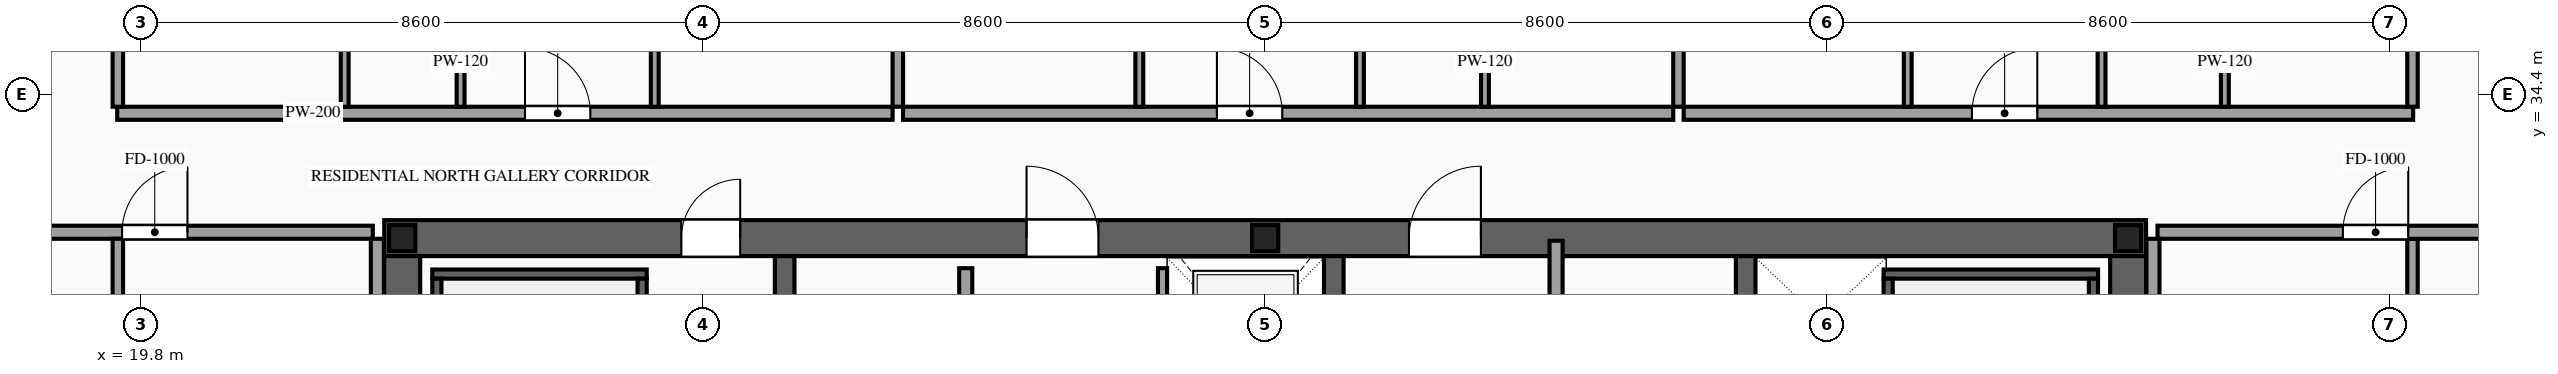
"""IFC4 building model, lengths in metres.
Left out: names, types, materials, properties, quantities, classifications, styles, units other than length and angle.
Written with IfcOpenShell. Run it as: python <this file> out.ifc"""

import sys

from ifc_helpers import new_model, si_unit, direction, frame, frame_2d, origin, origin_2d, place, context, subcontext, project, spatial, rectangle, i_section, extrude, source, transform, mapped, element, fill, save


model = new_model("IFC4")
c1 = context("Model", 3, precision=1e-05, world=origin(), true_north=direction((0.0, 1.0)))
c2 = subcontext(c1, "Body", "Model", "MODEL_VIEW")
j1 = project(units=[si_unit("LENGTHUNIT", "METRE"), si_unit("PLANEANGLEUNIT", "RADIAN")], contexts=[c1])
p1 = place(None, origin())
s1 = spatial("IfcSite", under=j1, at=p1, CompositionType="ELEMENT")
p2 = place(p1, origin())
s2 = spatial("IfcBuilding", under=s1, at=p2, CompositionType="ELEMENT")
p3 = place(p2, frame((0.0, 0.0, 252.1)))
s3 = spatial("IfcBuildingStorey", under=s2, at=p3, CompositionType="ELEMENT", Elevation=252.1)
p4 = place(p3, frame((23.525, 32.2, 0.0), z_axis=(0.0, 0.0, 1.0), x_axis=(1.0, 0.0, 0.0)))
e1 = element("IfcWall", 1, at=p4, inside=s3, PredefinedType="SHEAR", context=c2, shape_type="SweptSolid", body=[
    extrude(rectangle(XDim=26.95, YDim=0.55, at=frame_2d((13.475, 0.0))), origin(), (0.0, 0.0, 1.0), 3.5),
])
p5 = place(p4, frame((4.545, 0.0, 0.0)))
e2 = element("IfcOpeningElement", 2, at=p5, cuts=e1, PredefinedType="OPENING", context=c2, shape_type="SweptSolid", body=[
    extrude(rectangle(XDim=0.9, YDim=2.15, at=frame_2d((0.45, 1.075))), frame((0.0, 0.29, 0.0), z_axis=(0.0, -1.0, 0.0), x_axis=(1.0, 0.0, 0.0)), (0.0, 0.0, 1.0), 0.58),
])
p6 = place(p4, frame((9.825, 0.0, 0.0)))
e3 = element("IfcOpeningElement", 3, at=p6, cuts=e1, PredefinedType="OPENING", context=c2, shape_type="SweptSolid", body=[
    extrude(rectangle(XDim=1.1, YDim=2.2, at=frame_2d((0.55, 1.1))), frame((0.0, 0.29, 0.0), z_axis=(0.0, -1.0, 0.0), x_axis=(1.0, 0.0, 0.0)), (0.0, 0.0, 1.0), 0.58),
])
p7 = place(p4, frame((15.675, 0.0, 0.0)))
e4 = element("IfcOpeningElement", 4, at=p7, cuts=e1, PredefinedType="OPENING", context=c2, shape_type="SweptSolid", body=[
    extrude(rectangle(XDim=1.1, YDim=2.2, at=frame_2d((0.55, 1.1))), frame((0.0, 0.29, 0.0), z_axis=(0.0, -1.0, 0.0), x_axis=(1.0, 0.0, 0.0)), (0.0, 0.0, 1.0), 0.58),
])
m1 = source(origin(), c2, "Body", "SweptSolid", [
    extrude(rectangle(XDim=12.25, YDim=0.55, at=frame_2d((6.125, 0.0))), origin(), (0.0, 0.0, 1.0), 3.5),
])
for number, where, z_axis, x_axis in (
    (5, (23.8, 19.675, 0.0), (0.0, 0.0, 1.0), (0.0, 1.0, 0.0)),
    (6, (50.2, 19.675, 0.0), (0.0, 0.0, 1.0), (0.0, 1.0, 0.0)),
):
    element("IfcWall", number, at=place(p3, frame(where, z_axis=z_axis, x_axis=x_axis)), inside=s3, PredefinedType="SHEAR", context=c2, shape_type="MappedRepresentation", body=[
        mapped(m1, transform((0.0, 0.0, 0.0), scale=1.0)),
    ])
m2 = source(origin(), c2, "Body", "SweptSolid", [
    extrude(rectangle(XDim=12.25, YDim=0.3, at=frame_2d((6.125, 0.0))), origin(), (0.0, 0.0, 1.0), 3.5),
])
for number, where, z_axis, x_axis in (
    (7, (29.65, 19.675, 0.0), (0.0, 0.0, 1.0), (0.0, 1.0, 0.0)),
    (8, (38.05, 19.675, 0.0), (0.0, 0.0, 1.0), (0.0, 1.0, 0.0)),
    (9, (44.35, 19.675, 0.0), (0.0, 0.0, 1.0), (0.0, 1.0, 0.0)),
):
    element("IfcWall", number, at=place(p3, frame(where, z_axis=z_axis, x_axis=x_axis)), inside=s3, PredefinedType="SOLIDWALL", context=c2, shape_type="MappedRepresentation", body=[
        mapped(m2, transform((0.0, 0.0, 0.0), scale=1.0)),
    ])
m3 = source(origin(), c2, "Body", "SweptSolid", [
    extrude(i_section(OverallWidth=0.4, OverallDepth=0.4, WebThickness=0.013, FlangeThickness=0.021, at=origin_2d()), origin(), (0.0, 0.0, 1.0), 3.5),
])
for number, where, z_axis, x_axis in (
    (10, (23.8, 32.2, 0.0), (0.0, 0.0, 1.0), (1.0, 0.0, 0.0)),
    (11, (37.0, 32.2, 0.0), (0.0, 0.0, 1.0), (1.0, 0.0, 0.0)),
    (12, (50.2, 32.2, 0.0), (0.0, 0.0, 1.0), (1.0, 0.0, 0.0)),
):
    element("IfcColumn", number, at=place(p3, frame(where, z_axis=z_axis, x_axis=x_axis)), inside=s3, PredefinedType="COLUMN", context=c2, shape_type="MappedRepresentation", body=[
        mapped(m3, transform((0.0, 0.0, 0.0), scale=1.0)),
    ])
p8 = place(p3, frame((35.43, 29.4, 0.0), z_axis=(0.0, 0.0, 1.0), x_axis=(0.0, 1.0, 0.0)))
e13 = element("IfcWall", 13, at=p8, inside=s3, PredefinedType="SOLIDWALL", context=c2, shape_type="SweptSolid", body=[
    extrude(rectangle(XDim=2.34, YDim=0.14, at=frame_2d((1.17, 0.0))), origin(), (0.0, 0.0, 1.0), 3.28),
])
p9 = place(p8, frame((0.62, 0.0, 0.0)))
e14 = element("IfcOpeningElement", 14, at=p9, cuts=e13, PredefinedType="OPENING", context=c2, shape_type="SweptSolid", body=[
    extrude(rectangle(XDim=1.1, YDim=2.2, at=frame_2d((0.55, 1.1))), frame((0.0, 0.085, 0.0), z_axis=(0.0, -1.0, 0.0), x_axis=(1.0, 0.0, 0.0)), (0.0, 0.0, 1.0), 0.17),
])
m4 = source(origin(), c2, "Body", "SweptSolid", [
    extrude(rectangle(XDim=3.28, YDim=0.14, at=frame_2d((1.64, 0.0))), origin(), (0.0, 0.0, 1.0), 3.28),
])
p10 = place(p3, frame((24.26, 31.65, 0.0), z_axis=(0.0, 0.0, 1.0), x_axis=(1.0, 0.0, 0.0)))
e15 = element("IfcWall", 15, at=p10, inside=s3, PredefinedType="SOLIDWALL", context=c2, shape_type="MappedRepresentation", body=[
    mapped(m4, transform((0.0, 0.0, 0.0), scale=1.0)),
])
m5 = source(origin(), c2, "Body", "SweptSolid", [
    extrude(rectangle(XDim=8.94, YDim=0.14, at=frame_2d((4.47, 0.0))), origin(), (0.0, 0.0, 1.0), 3.28),
])
for number, where, z_axis, x_axis in (
    (16, (24.33, 22.64, 0.0), (0.0, 0.0, 1.0), (0.0, 1.0, 0.0)),
    (17, (27.47, 22.64, 0.0), (0.0, 0.0, 1.0), (0.0, 1.0, 0.0)),
):
    element("IfcWall", number, at=place(p3, frame(where, z_axis=z_axis, x_axis=x_axis)), inside=s3, PredefinedType="SOLIDWALL", context=c2, shape_type="MappedRepresentation", body=[
        mapped(m5, transform((0.0, 0.0, 0.0), scale=1.0)),
    ])
p11 = place(p3, frame((46.46, 31.65, 0.0), z_axis=(0.0, 0.0, 1.0), x_axis=(1.0, 0.0, 0.0)))
e18 = element("IfcWall", 18, at=p11, inside=s3, PredefinedType="SOLIDWALL", context=c2, shape_type="MappedRepresentation", body=[
    mapped(m4, transform((0.0, 0.0, 0.0), scale=1.0)),
])
for number, where, z_axis, x_axis in (
    (19, (46.53, 22.64, 0.0), (0.0, 0.0, 1.0), (0.0, 1.0, 0.0)),
    (20, (49.67, 22.64, 0.0), (0.0, 0.0, 1.0), (0.0, 1.0, 0.0)),
):
    element("IfcWall", number, at=place(p3, frame(where, z_axis=z_axis, x_axis=x_axis)), inside=s3, PredefinedType="SOLIDWALL", context=c2, shape_type="MappedRepresentation", body=[
        mapped(m5, transform((0.0, 0.0, 0.0), scale=1.0)),
    ])
p12 = place(p3, frame((32.42, 19.86, 0.0), z_axis=(0.0, 0.0, 1.0), x_axis=(0.0, 1.0, 0.0)))
e21 = element("IfcWall", 21, at=p12, inside=s3, PredefinedType="PARTITIONING", context=c2, shape_type="SweptSolid", body=[
    extrude(rectangle(XDim=11.88, YDim=0.2, at=frame_2d((5.94, 0.0))), origin(), (0.0, 0.0, 1.0), 3.28),
])
p13 = place(p12, frame((5.49, 0.0, 0.0)))
e22 = element("IfcOpeningElement", 22, at=p13, cuts=e21, PredefinedType="OPENING", context=c2, shape_type="SweptSolid", body=[
    extrude(rectangle(XDim=0.9, YDim=2.15, at=frame_2d((0.45, 1.075))), frame((0.0, 0.115, 0.0), z_axis=(0.0, -1.0, 0.0), x_axis=(1.0, 0.0, 0.0)), (0.0, 0.0, 1.0), 0.23),
])
m6 = source(origin(), c2, "Body", "SweptSolid", [
    extrude(rectangle(XDim=12.72, YDim=0.2, at=frame_2d((6.36, 0.0))), origin(), (0.0, 0.0, 1.0), 3.28),
])
p14 = place(p3, frame((41.45, 19.44, 0.0), z_axis=(0.0, 0.0, 1.0), x_axis=(0.0, 1.0, 0.0)))
e23 = element("IfcWall", 23, at=p14, inside=s3, PredefinedType="PARTITIONING", context=c2, shape_type="MappedRepresentation", body=[
    mapped(m6, transform((0.0, 0.0, 0.0), scale=1.0)),
])
p15 = place(p3, frame((19.44, 34.11, 0.0), z_axis=(0.0, 0.0, 1.0), x_axis=(1.0, 0.0, 0.0)))
e24 = element("IfcWall", 24, at=p15, inside=s3, PredefinedType="PARTITIONING", context=c2, shape_type="SweptSolid", body=[
    extrude(rectangle(XDim=11.861, YDim=0.2, at=frame_2d((5.931, 0.0))), origin(), (0.0, 0.0, 1.0), 3.28),
])
p16 = place(p15, frame((6.238, 0.0, 0.0)))
e25 = element("IfcOpeningElement", 25, at=p16, cuts=e24, PredefinedType="OPENING", context=c2, shape_type="SweptSolid", body=[
    extrude(rectangle(XDim=1.0, YDim=2.2, at=frame_2d((0.5, 1.1))), frame((0.0, 0.115, 0.0), z_axis=(0.0, -1.0, 0.0), x_axis=(1.0, 0.0, 0.0)), (0.0, 0.0, 1.0), 0.23),
])
m7 = source(origin(), c2, "Body", "SweptSolid", [
    extrude(rectangle(XDim=12.04, YDim=0.16, at=frame_2d((6.02, 0.0))), origin(), (0.0, 0.0, 1.0), 3.28),
])
p17 = place(p3, frame((31.381, 34.21, 0.0), z_axis=(0.0, 0.0, 1.0), x_axis=(0.0, 1.0, 0.0)))
e26 = element("IfcWall", 26, at=p17, inside=s3, PredefinedType="PARTITIONING", context=c2, shape_type="MappedRepresentation", body=[
    mapped(m7, transform((0.0, 0.0, 0.0), scale=1.0)),
])
m8 = source(origin(), c2, "Body", "SweptSolid", [
    extrude(rectangle(XDim=4.11, YDim=0.12, at=frame_2d((2.055, 0.0))), origin(), (0.0, 0.0, 1.0), 3.28),
])
p18 = place(p3, frame((22.92, 34.21, 0.0), z_axis=(0.0, 0.0, 1.0), x_axis=(0.0, 1.0, 0.0)))
e27 = element("IfcWall", 27, at=p18, inside=s3, PredefinedType="PARTITIONING", context=c2, shape_type="MappedRepresentation", body=[
    mapped(m8, transform((0.0, 0.0, 0.0), scale=1.0)),
])
p19 = place(p3, frame((24.693, 34.21, 0.0), z_axis=(0.0, 0.0, 1.0), x_axis=(0.0, 1.0, 0.0)))
e28 = element("IfcWall", 28, at=p19, inside=s3, PredefinedType="PARTITIONING", context=c2, shape_type="SweptSolid", body=[
    extrude(rectangle(XDim=4.11, YDim=0.12, at=frame_2d((2.055, 0.0))), origin(), (0.0, 0.0, 1.0), 3.28),
])
p20 = place(p19, frame((1.63, 0.0, 0.0)))
e29 = element("IfcOpeningElement", 29, at=p20, cuts=e28, PredefinedType="OPENING", context=c2, shape_type="SweptSolid", body=[
    extrude(rectangle(XDim=0.85, YDim=2.1, at=frame_2d((0.425, 1.05))), frame((0.0, 0.075, 0.0), z_axis=(0.0, -1.0, 0.0), x_axis=(1.0, 0.0, 0.0)), (0.0, 0.0, 1.0), 0.15),
])
p21 = place(p3, frame((27.663, 34.21, 0.0), z_axis=(0.0, 0.0, 1.0), x_axis=(0.0, 1.0, 0.0)))
e30 = element("IfcWall", 30, at=p21, inside=s3, PredefinedType="PARTITIONING", context=c2, shape_type="MappedRepresentation", body=[
    mapped(m8, transform((0.0, 0.0, 0.0), scale=1.0)),
])
p22 = place(p3, frame((31.461, 34.11, 0.0), z_axis=(0.0, 0.0, 1.0), x_axis=(1.0, 0.0, 0.0)))
e31 = element("IfcWall", 31, at=p22, inside=s3, PredefinedType="PARTITIONING", context=c2, shape_type="SweptSolid", body=[
    extrude(rectangle(XDim=11.781, YDim=0.2, at=frame_2d((5.891, 0.0))), origin(), (0.0, 0.0, 1.0), 3.28),
])
p23 = place(p22, frame((4.801, 0.0, 0.0)))
e32 = element("IfcOpeningElement", 32, at=p23, cuts=e31, PredefinedType="OPENING", context=c2, shape_type="SweptSolid", body=[
    extrude(rectangle(XDim=1.0, YDim=2.2, at=frame_2d((0.5, 1.1))), frame((0.0, 0.115, 0.0), z_axis=(0.0, -1.0, 0.0), x_axis=(1.0, 0.0, 0.0)), (0.0, 0.0, 1.0), 0.23),
])
p24 = place(p3, frame((43.322, 34.21, 0.0), z_axis=(0.0, 0.0, 1.0), x_axis=(0.0, 1.0, 0.0)))
e33 = element("IfcWall", 33, at=p24, inside=s3, PredefinedType="PARTITIONING", context=c2, shape_type="MappedRepresentation", body=[
    mapped(m7, transform((0.0, 0.0, 0.0), scale=1.0)),
])
p25 = place(p3, frame((35.075, 34.21, 0.0), z_axis=(0.0, 0.0, 1.0), x_axis=(0.0, 1.0, 0.0)))
e34 = element("IfcWall", 34, at=p25, inside=s3, PredefinedType="PARTITIONING", context=c2, shape_type="MappedRepresentation", body=[
    mapped(m8, transform((0.0, 0.0, 0.0), scale=1.0)),
])
p26 = place(p3, frame((40.362, 34.21, 0.0), z_axis=(0.0, 0.0, 1.0), x_axis=(0.0, 1.0, 0.0)))
e35 = element("IfcWall", 35, at=p26, inside=s3, PredefinedType="PARTITIONING", context=c2, shape_type="SweptSolid", body=[
    extrude(rectangle(XDim=4.11, YDim=0.12, at=frame_2d((2.055, 0.0))), origin(), (0.0, 0.0, 1.0), 3.28),
])
p27 = place(p26, frame((1.63, 0.0, 0.0)))
e36 = element("IfcOpeningElement", 36, at=p27, cuts=e35, PredefinedType="OPENING", context=c2, shape_type="SweptSolid", body=[
    extrude(rectangle(XDim=0.85, YDim=2.1, at=frame_2d((0.425, 1.05))), frame((0.0, 0.075, 0.0), z_axis=(0.0, -1.0, 0.0), x_axis=(1.0, 0.0, 0.0)), (0.0, 0.0, 1.0), 0.15),
])
p28 = place(p3, frame((38.45, 34.21, 0.0), z_axis=(0.0, 0.0, 1.0), x_axis=(0.0, 1.0, 0.0)))
e37 = element("IfcWall", 37, at=p28, inside=s3, PredefinedType="PARTITIONING", context=c2, shape_type="SweptSolid", body=[
    extrude(rectangle(XDim=4.11, YDim=0.12, at=frame_2d((2.055, 0.0))), origin(), (0.0, 0.0, 1.0), 3.28),
])
p29 = place(p28, frame((1.63, 0.0, 0.0)))
e38 = element("IfcOpeningElement", 38, at=p29, cuts=e37, PredefinedType="OPENING", context=c2, shape_type="SweptSolid", body=[
    extrude(rectangle(XDim=0.85, YDim=2.1, at=frame_2d((0.425, 1.05))), frame((0.0, 0.075, 0.0), z_axis=(0.0, -1.0, 0.0), x_axis=(1.0, 0.0, 0.0)), (0.0, 0.0, 1.0), 0.15),
])
p30 = place(p3, frame((43.402, 34.11, 0.0), z_axis=(0.0, 0.0, 1.0), x_axis=(1.0, 0.0, 0.0)))
e39 = element("IfcWall", 39, at=p30, inside=s3, PredefinedType="PARTITIONING", context=c2, shape_type="SweptSolid", body=[
    extrude(rectangle(XDim=11.158, YDim=0.2, at=frame_2d((5.579, 0.0))), origin(), (0.0, 0.0, 1.0), 3.28),
])
p31 = place(p30, frame((4.409, 0.0, 0.0)))
e40 = element("IfcOpeningElement", 40, at=p31, cuts=e39, PredefinedType="OPENING", context=c2, shape_type="SweptSolid", body=[
    extrude(rectangle(XDim=1.0, YDim=2.2, at=frame_2d((0.5, 1.1))), frame((0.0, 0.115, 0.0), z_axis=(0.0, -1.0, 0.0), x_axis=(1.0, 0.0, 0.0)), (0.0, 0.0, 1.0), 0.23),
])
m9 = source(origin(), c2, "Body", "SweptSolid", [
    extrude(rectangle(XDim=11.89, YDim=0.16, at=frame_2d((5.945, 0.0))), origin(), (0.0, 0.0, 1.0), 3.28),
])
for number, where, z_axis, x_axis in (
    (41, (19.45, 34.21, 0.0), (0.0, 0.0, 1.0), (0.0, 1.0, 0.0)),
    (42, (54.55, 34.21, 0.0), (0.0, 0.0, 1.0), (0.0, 1.0, 0.0)),
):
    element("IfcWall", number, at=place(p3, frame(where, z_axis=z_axis, x_axis=x_axis)), inside=s3, PredefinedType="PARTITIONING", context=c2, shape_type="MappedRepresentation", body=[
        mapped(m9, transform((0.0, 0.0, 0.0), scale=1.0)),
    ])
p32 = place(p3, frame((46.829, 34.21, 0.0), z_axis=(0.0, 0.0, 1.0), x_axis=(0.0, 1.0, 0.0)))
e43 = element("IfcWall", 43, at=p32, inside=s3, PredefinedType="PARTITIONING", context=c2, shape_type="MappedRepresentation", body=[
    mapped(m8, transform((0.0, 0.0, 0.0), scale=1.0)),
])
p33 = place(p3, frame((51.68, 34.21, 0.0), z_axis=(0.0, 0.0, 1.0), x_axis=(0.0, 1.0, 0.0)))
e44 = element("IfcWall", 44, at=p33, inside=s3, PredefinedType="PARTITIONING", context=c2, shape_type="SweptSolid", body=[
    extrude(rectangle(XDim=4.11, YDim=0.12, at=frame_2d((2.055, 0.0))), origin(), (0.0, 0.0, 1.0), 3.28),
])
p34 = place(p33, frame((1.63, 0.0, 0.0)))
e45 = element("IfcOpeningElement", 45, at=p34, cuts=e44, PredefinedType="OPENING", context=c2, shape_type="SweptSolid", body=[
    extrude(rectangle(XDim=0.85, YDim=2.1, at=frame_2d((0.425, 1.05))), frame((0.0, 0.075, 0.0), z_axis=(0.0, -1.0, 0.0), x_axis=(1.0, 0.0, 0.0)), (0.0, 0.0, 1.0), 0.15),
])
p35 = place(p3, frame((49.794, 34.21, 0.0), z_axis=(0.0, 0.0, 1.0), x_axis=(0.0, 1.0, 0.0)))
e46 = element("IfcWall", 46, at=p35, inside=s3, PredefinedType="PARTITIONING", context=c2, shape_type="SweptSolid", body=[
    extrude(rectangle(XDim=4.11, YDim=0.12, at=frame_2d((2.055, 0.0))), origin(), (0.0, 0.0, 1.0), 3.28),
])
p36 = place(p35, frame((1.63, 0.0, 0.0)))
e47 = element("IfcOpeningElement", 47, at=p36, cuts=e46, PredefinedType="OPENING", context=c2, shape_type="SweptSolid", body=[
    extrude(rectangle(XDim=0.85, YDim=2.1, at=frame_2d((0.425, 1.05))), frame((0.0, 0.075, 0.0), z_axis=(0.0, -1.0, 0.0), x_axis=(1.0, 0.0, 0.0)), (0.0, 0.0, 1.0), 0.15),
])
p37 = place(p3, frame((16.55, 32.29, 0.0), z_axis=(0.0, 0.0, 1.0), x_axis=(1.0, 0.0, 0.0)))
e48 = element("IfcWall", 48, at=p37, inside=s3, PredefinedType="PARTITIONING", context=c2, shape_type="SweptSolid", body=[
    extrude(rectangle(XDim=6.8, YDim=0.2, at=frame_2d((3.4, 0.0))), origin(), (0.0, 0.0, 1.0), 2.825),
])
p38 = place(p37, frame((2.965, 0.0, 0.0)))
e49 = element("IfcOpeningElement", 49, at=p38, cuts=e48, PredefinedType="OPENING", context=c2, shape_type="SweptSolid", body=[
    extrude(rectangle(XDim=1.0, YDim=2.2, at=frame_2d((0.5, 1.1))), frame((0.0, 0.115, 0.0), z_axis=(0.0, -1.0, 0.0), x_axis=(1.0, 0.0, 0.0)), (0.0, 0.0, 1.0), 0.23),
])
m10 = source(origin(), c2, "Body", "SweptSolid", [
    extrude(rectangle(XDim=26.69, YDim=0.16, at=frame_2d((13.345, 0.0))), origin(), (0.0, 0.0, 1.0), 3.28),
])
for number, where, z_axis, x_axis in (
    (50, (19.45, 5.5, 0.0), (0.0, 0.0, 1.0), (0.0, 1.0, 0.0)),
    (51, (54.55, 5.5, 0.0), (0.0, 0.0, 1.0), (0.0, 1.0, 0.0)),
):
    element("IfcWall", number, at=place(p3, frame(where, z_axis=z_axis, x_axis=x_axis)), inside=s3, PredefinedType="PARTITIONING", context=c2, shape_type="MappedRepresentation", body=[
        mapped(m10, transform((0.0, 0.0, 0.0), scale=1.0)),
    ])
m11 = source(origin(), c2, "Body", "SweptSolid", [
    extrude(rectangle(XDim=6.29, YDim=0.2, at=frame_2d((3.145, 0.0))), origin(), (0.0, 0.0, 1.0), 3.28),
])
p39 = place(p3, frame((23.42, 25.9, 0.0), z_axis=(0.0, 0.0, 1.0), x_axis=(0.0, 1.0, 0.0)))
e52 = element("IfcWall", 52, at=p39, inside=s3, PredefinedType="PARTITIONING", context=c2, shape_type="MappedRepresentation", body=[
    mapped(m11, transform((0.0, 0.0, 0.0), scale=1.0)),
])
p40 = place(p3, frame((50.65, 32.29, 0.0), z_axis=(0.0, 0.0, 1.0), x_axis=(1.0, 0.0, 0.0)))
e53 = element("IfcWall", 53, at=p40, inside=s3, PredefinedType="PARTITIONING", context=c2, shape_type="SweptSolid", body=[
    extrude(rectangle(XDim=6.8, YDim=0.2, at=frame_2d((3.4, 0.0))), origin(), (0.0, 0.0, 1.0), 2.825),
])
p41 = place(p40, frame((2.835, 0.0, 0.0)))
e54 = element("IfcOpeningElement", 54, at=p41, cuts=e53, PredefinedType="OPENING", context=c2, shape_type="SweptSolid", body=[
    extrude(rectangle(XDim=1.0, YDim=2.2, at=frame_2d((0.5, 1.1))), frame((0.0, 0.115, 0.0), z_axis=(0.0, -1.0, 0.0), x_axis=(1.0, 0.0, 0.0)), (0.0, 0.0, 1.0), 0.23),
])
p42 = place(p3, frame((50.58, 25.9, 0.0), z_axis=(0.0, 0.0, 1.0), x_axis=(0.0, 1.0, 0.0)))
e55 = element("IfcWall", 55, at=p42, inside=s3, PredefinedType="PARTITIONING", context=c2, shape_type="MappedRepresentation", body=[
    mapped(m11, transform((0.0, 0.0, 0.0), scale=1.0)),
])
m12 = source(origin(), c2, "Body", "SweptSolid", [
    extrude(rectangle(XDim=0.9, YDim=2.15, at=frame_2d((0.45, 1.075))), frame((0.0, 0.025, 0.0), z_axis=(0.0, -1.0, 0.0), x_axis=(1.0, 0.0, 0.0)), (0.0, 0.0, 1.0), 0.05),
])
p43 = place(p5, origin())
e56 = element("IfcDoor", 56, at=p43, inside=s3, OperationType="SINGLE_SWING_RIGHT", PredefinedType="DOOR", context=c2, shape_type="MappedRepresentation", body=[
    mapped(m12, transform((0.0, 0.0, 0.0), scale=1.0)),
])
fill(e2, e56)
m13 = source(origin(), c2, "Body", "SweptSolid", [
    extrude(rectangle(XDim=1.1, YDim=2.2, at=frame_2d((0.55, 1.1))), frame((0.0, 0.025, 0.0), z_axis=(0.0, -1.0, 0.0), x_axis=(1.0, 0.0, 0.0)), (0.0, 0.0, 1.0), 0.05),
])
p44 = place(p6, origin())
e57 = element("IfcDoor", 57, at=p44, inside=s3, OperationType="SINGLE_SWING_LEFT", PredefinedType="DOOR", context=c2, shape_type="MappedRepresentation", body=[
    mapped(m13, transform((0.0, 0.0, 0.0), scale=1.0)),
])
fill(e3, e57)
p45 = place(p7, origin())
e58 = element("IfcDoor", 58, at=p45, inside=s3, OperationType="SINGLE_SWING_RIGHT", PredefinedType="DOOR", context=c2, shape_type="MappedRepresentation", body=[
    mapped(m13, transform((0.0, 0.0, 0.0), scale=1.0)),
])
fill(e4, e58)
m14 = source(origin(), c2, "Body", "SweptSolid", [
    extrude(rectangle(XDim=1.0, YDim=2.2, at=frame_2d((0.5, 1.1))), frame((0.0, 0.025, 0.0), z_axis=(0.0, -1.0, 0.0), x_axis=(1.0, 0.0, 0.0)), (0.0, 0.0, 1.0), 0.05),
])
p46 = place(p16, origin())
e59 = element("IfcDoor", 59, at=p46, inside=s3, OperationType="SINGLE_SWING_LEFT", PredefinedType="DOOR", context=c2, shape_type="MappedRepresentation", body=[
    mapped(m14, transform((0.0, 0.0, 0.0), scale=1.0)),
])
fill(e25, e59)
p47 = place(p23, origin())
e60 = element("IfcDoor", 60, at=p47, inside=s3, OperationType="SINGLE_SWING_LEFT", PredefinedType="DOOR", context=c2, shape_type="MappedRepresentation", body=[
    mapped(m14, transform((0.0, 0.0, 0.0), scale=1.0)),
])
fill(e32, e60)
p48 = place(p31, origin())
e61 = element("IfcDoor", 61, at=p48, inside=s3, OperationType="SINGLE_SWING_RIGHT", PredefinedType="DOOR", context=c2, shape_type="MappedRepresentation", body=[
    mapped(m14, transform((0.0, 0.0, 0.0), scale=1.0)),
])
fill(e40, e61)
p49 = place(p38, origin())
e62 = element("IfcDoor", 62, at=p49, inside=s3, OperationType="SINGLE_SWING_RIGHT", PredefinedType="DOOR", context=c2, shape_type="MappedRepresentation", body=[
    mapped(m14, transform((0.0, 0.0, 0.0), scale=1.0)),
])
fill(e49, e62)
p50 = place(p41, origin())
e63 = element("IfcDoor", 63, at=p50, inside=s3, OperationType="SINGLE_SWING_RIGHT", PredefinedType="DOOR", context=c2, shape_type="MappedRepresentation", body=[
    mapped(m14, transform((0.0, 0.0, 0.0), scale=1.0)),
])
fill(e54, e63)
save(model, sys.argv[1])
